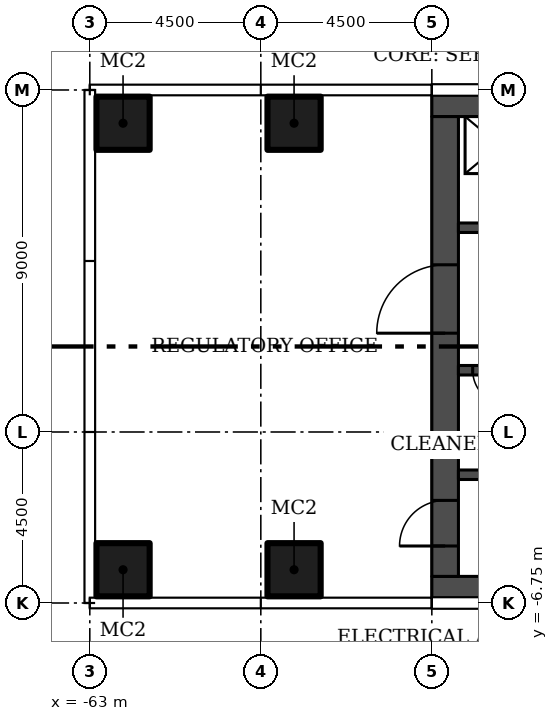
"""IFC4 building model, lengths in metres.
Left out: names, types, materials, properties, quantities, classifications, styles, units other than length and angle.
Written with IfcOpenShell. Run it as: python <this file> out.ifc"""

import sys

from ifc_helpers import new_model, si_unit, direction, frame, frame_2d, origin, origin_2d, place, context, subcontext, project, spatial, rectangle, hollow_rectangle, extrude, element, fill, save


model = new_model("IFC4")
c1 = context("Model", 3, precision=1e-05, world=origin(), true_north=direction((0.0, 1.0)))
c2 = subcontext(c1, "Body", "Model", "MODEL_VIEW")
j1 = project(units=[si_unit("LENGTHUNIT", "METRE"), si_unit("PLANEANGLEUNIT", "RADIAN")], contexts=[c1])
p1 = place(None, origin())
s1 = spatial("IfcSite", under=j1, at=p1, CompositionType="ELEMENT")
p2 = place(p1, origin())
s2 = spatial("IfcBuilding", under=s1, at=p2, CompositionType="ELEMENT")
p3 = place(p2, frame((0.0, 0.0, 61.5)))
s3 = spatial("IfcBuildingStorey", under=s2, at=p3, CompositionType="ELEMENT", Elevation=61.5)
for number, where in (
    (1, (-57.625, -5.875, 0.0)),
    (2, (-62.125, -5.875, 0.0)),
    (3, (-57.625, 5.875, 0.0)),
    (4, (-62.125, 5.875, 0.0)),
):
    element("IfcColumn", number, at=place(p3, frame(where)), inside=s3, PredefinedType="COLUMN", context=c2, shape_type="SweptSolid", body=[
        extrude(hollow_rectangle(XDim=1.4, YDim=1.4, WallThickness=0.05, at=origin_2d()), origin(), (0.0, 0.0, 1.0), 3.55),
    ])
for number, where, z_axis, x_axis in (
    (5, (-40.5, -6.4, 0.0), (0.0, 0.0, 1.0), (-1.0, 0.0, 0.0)),
    (6, (-40.5, 6.4, 0.0), (0.0, 0.0, 1.0), (-1.0, 0.0, 0.0)),
):
    element("IfcWall", number, at=place(p3, frame(where, z_axis=z_axis, x_axis=x_axis)), inside=s3, PredefinedType="SHEAR", context=c2, shape_type="SweptSolid", body=[
        extrude(rectangle(XDim=13.5, YDim=0.7, at=frame_2d((6.75, 0.0))), origin(), (0.0, 0.0, 1.0), 3.55),
    ])
p4 = place(p3, frame((-53.65, -6.05, 0.0), z_axis=(0.0, 0.0, 1.0), x_axis=(0.0, 1.0, 0.0)))
e7 = element("IfcWall", 7, at=p4, inside=s3, PredefinedType="SHEAR", context=c2, shape_type="SweptSolid", body=[
    extrude(rectangle(XDim=12.1, YDim=0.7, at=frame_2d((6.05, 0.0))), origin(), (0.0, 0.0, 1.0), 3.55),
])
p5 = place(p4, frame((0.8, 0.0, 0.0)))
e8 = element("IfcOpeningElement", 8, at=p5, cuts=e7, PredefinedType="OPENING", context=c2, shape_type="SweptSolid", body=[
    extrude(rectangle(XDim=1.2, YDim=2.1, at=frame_2d((0.6, 1.05))), frame((0.0, 0.36, 0.0), z_axis=(0.0, -1.0, 0.0), x_axis=(1.0, 0.0, 0.0)), (0.0, 0.0, 1.0), 0.72),
])
p6 = place(p4, frame((6.4, 0.0, 0.0)))
e9 = element("IfcOpeningElement", 9, at=p6, cuts=e7, PredefinedType="OPENING", context=c2, shape_type="SweptSolid", body=[
    extrude(rectangle(XDim=1.8, YDim=2.4, at=frame_2d((0.9, 1.2))), frame((0.0, 0.36, 0.0), z_axis=(0.0, -1.0, 0.0), x_axis=(1.0, 0.0, 0.0)), (0.0, 0.0, 1.0), 0.72),
])
p7 = place(p3, frame((-41.2, -3.375, 0.0), z_axis=(0.0, 0.0, 1.0), x_axis=(-1.0, 0.0, 0.0)))
e10 = element("IfcWall", 10, at=p7, inside=s3, PredefinedType="SHEAR", context=c2, shape_type="SweptSolid", body=[
    extrude(rectangle(XDim=12.1, YDim=0.25, at=frame_2d((6.05, 0.0))), origin(), (0.0, 0.0, 1.0), 3.55),
])
p8 = place(p7, frame((0.05, 0.0, 0.0)))
e11 = element("IfcOpeningElement", 11, at=p8, cuts=e10, PredefinedType="OPENING", context=c2, shape_type="SweptSolid", body=[
    extrude(rectangle(XDim=1.1, YDim=2.1, at=frame_2d((0.55, 1.05))), frame((0.0, 0.135, 0.0), z_axis=(0.0, -1.0, 0.0), x_axis=(1.0, 0.0, 0.0)), (0.0, 0.0, 1.0), 0.27),
])
p9 = place(p3, frame((-41.2, -0.625, 0.0), z_axis=(0.0, 0.0, 1.0), x_axis=(-1.0, 0.0, 0.0)))
e12 = element("IfcWall", 12, at=p9, inside=s3, PredefinedType="SHEAR", context=c2, shape_type="SweptSolid", body=[
    extrude(rectangle(XDim=12.1, YDim=0.25, at=frame_2d((6.05, 0.0))), origin(), (0.0, 0.0, 1.0), 3.55),
])
p10 = place(p9, frame((2.25, 0.0, 0.0)))
e13 = element("IfcOpeningElement", 13, at=p10, cuts=e12, PredefinedType="OPENING", context=c2, shape_type="SweptSolid", body=[
    extrude(rectangle(XDim=1.2, YDim=2.1, at=frame_2d((0.6, 1.05))), frame((0.0, 0.135, 0.0), z_axis=(0.0, -1.0, 0.0), x_axis=(1.0, 0.0, 0.0)), (0.0, 0.0, 1.0), 0.27),
])
p11 = place(p9, frame((9.2, 0.0, 0.0)))
e14 = element("IfcOpeningElement", 14, at=p11, cuts=e12, PredefinedType="OPENING", context=c2, shape_type="SweptSolid", body=[
    extrude(rectangle(XDim=0.9, YDim=2.1, at=frame_2d((0.45, 1.05))), frame((0.0, 0.135, 0.0), z_axis=(0.0, -1.0, 0.0), x_axis=(1.0, 0.0, 0.0)), (0.0, 0.0, 1.0), 0.27),
])
p12 = place(p9, frame((10.825, 0.0, 0.0)))
e15 = element("IfcOpeningElement", 15, at=p12, cuts=e12, PredefinedType="OPENING", context=c2, shape_type="SweptSolid", body=[
    extrude(rectangle(XDim=0.9, YDim=2.1, at=frame_2d((0.45, 1.05))), frame((0.0, 0.135, 0.0), z_axis=(0.0, -1.0, 0.0), x_axis=(1.0, 0.0, 0.0)), (0.0, 0.0, 1.0), 0.27),
])
p13 = place(p3, frame((-48.5, 3.125, 0.0), z_axis=(0.0, 0.0, 1.0), x_axis=(-1.0, 0.0, 0.0)))
e16 = element("IfcWall", 16, at=p13, inside=s3, PredefinedType="SHEAR", context=c2, shape_type="SweptSolid", body=[
    extrude(rectangle(XDim=4.8, YDim=0.25, at=frame_2d((2.4, 0.0))), origin(), (0.0, 0.0, 1.0), 3.55),
])
p14 = place(p13, frame((0.775, 0.0, 0.0)))
e17 = element("IfcOpeningElement", 17, at=p14, cuts=e16, PredefinedType="OPENING", context=c2, shape_type="SweptSolid", body=[
    extrude(rectangle(XDim=1.1, YDim=2.1, at=frame_2d((0.55, 1.05))), frame((0.0, 0.135, 0.0), z_axis=(0.0, -1.0, 0.0), x_axis=(1.0, 0.0, 0.0)), (0.0, 0.0, 1.0), 0.27),
])
p15 = place(p5, origin())
e18 = element("IfcDoor", 18, at=p15, inside=s3, OperationType="SINGLE_SWING_LEFT", PredefinedType="DOOR", context=c2, shape_type="SweptSolid", body=[
    extrude(rectangle(XDim=1.2, YDim=2.1, at=frame_2d((0.6, 1.05))), frame((0.0, 0.025, 0.0), z_axis=(0.0, -1.0, 0.0), x_axis=(1.0, 0.0, 0.0)), (0.0, 0.0, 1.0), 0.05),
])
fill(e8, e18)
p16 = place(p6, origin())
e19 = element("IfcDoor", 19, at=p16, inside=s3, OperationType="DOUBLE_DOOR_SINGLE_SWING", PredefinedType="DOOR", context=c2, shape_type="SweptSolid", body=[
    extrude(rectangle(XDim=1.8, YDim=2.4, at=frame_2d((0.9, 1.2))), frame((0.0, 0.025, 0.0), z_axis=(0.0, -1.0, 0.0), x_axis=(1.0, 0.0, 0.0)), (0.0, 0.0, 1.0), 0.05),
])
fill(e9, e19)
p17 = place(p12, origin())
e20 = element("IfcDoor", 20, at=p17, inside=s3, OperationType="SINGLE_SWING_RIGHT", PredefinedType="DOOR", context=c2, shape_type="SweptSolid", body=[
    extrude(rectangle(XDim=0.9, YDim=2.1, at=frame_2d((0.45, 1.05))), frame((0.0, 0.025, 0.0), z_axis=(0.0, -1.0, 0.0), x_axis=(1.0, 0.0, 0.0)), (0.0, 0.0, 1.0), 0.05),
])
fill(e15, e20)
save(model, sys.argv[1])
